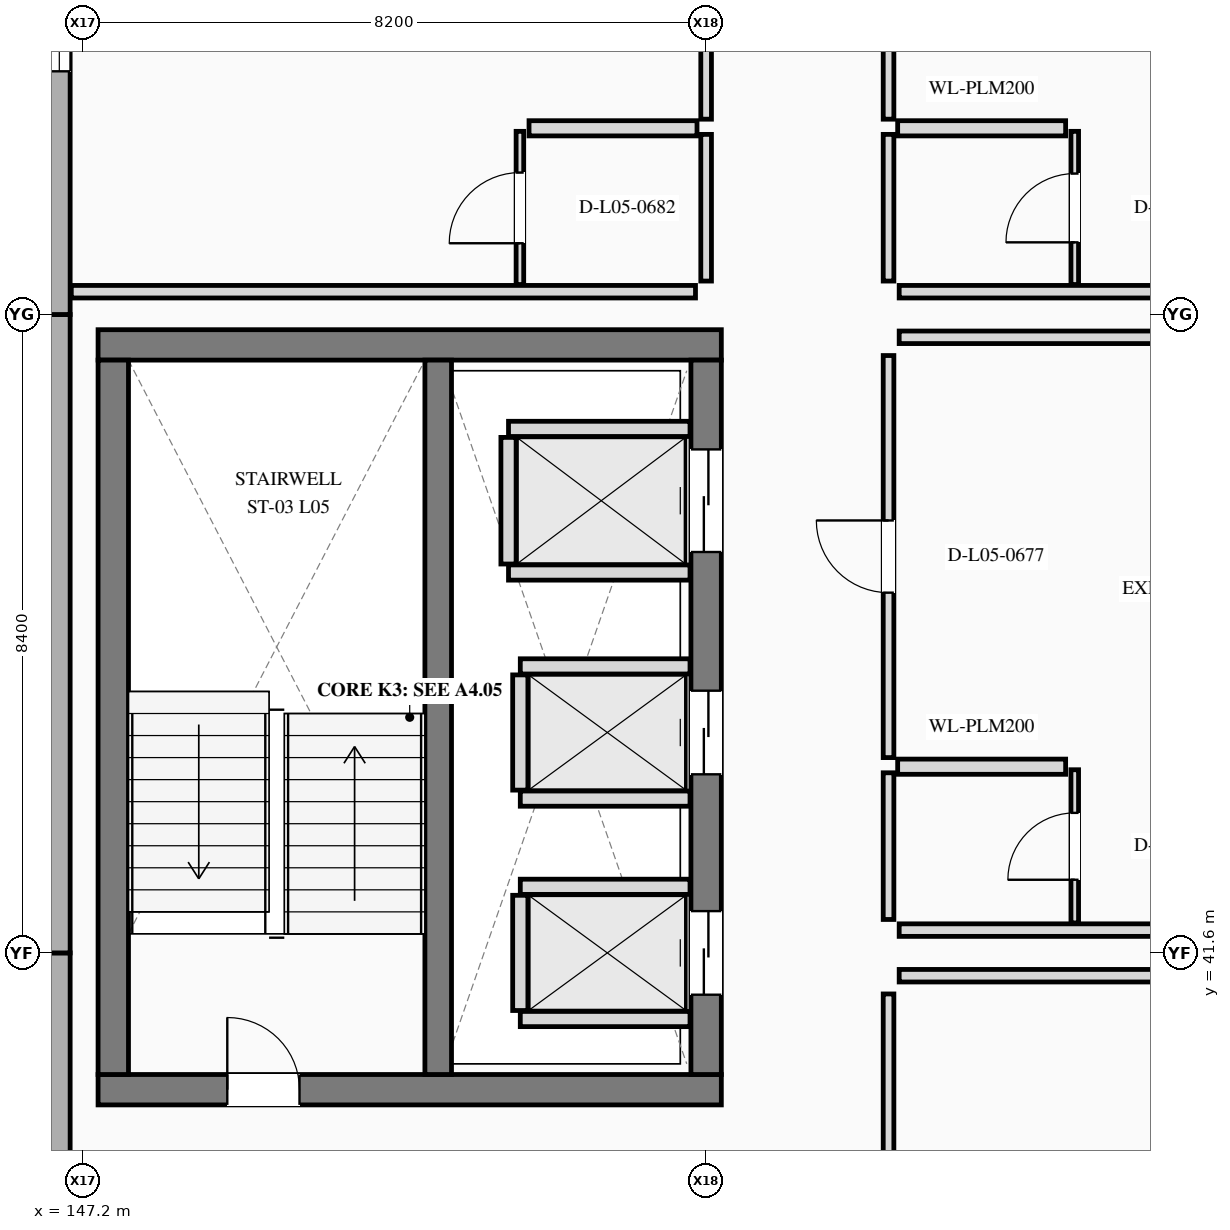
"""IFC4 building model, lengths in metres.
Left out: names, types, materials, properties, quantities, classifications, styles, units other than length and angle.
Written with IfcOpenShell. Run it as: python <this file> out.ifc"""

import sys

from ifc_helpers import new_model, si_unit, direction, frame, frame_2d, origin, place, context, subcontext, project, spatial, rectangle, extrude, element, fill, save


model = new_model("IFC4")
c1 = context("Model", 3, precision=1e-05, world=origin(), true_north=direction((0.0, 1.0)))
c2 = subcontext(c1, "Body", "Model", "MODEL_VIEW")
j1 = project(units=[si_unit("LENGTHUNIT", "METRE"), si_unit("PLANEANGLEUNIT", "RADIAN")], contexts=[c1])
p1 = place(None, origin())
s1 = spatial("IfcSite", under=j1, at=p1, CompositionType="ELEMENT")
p2 = place(p1, origin())
s2 = spatial("IfcBuilding", under=s1, at=p2, CompositionType="ELEMENT")
p3 = place(p2, frame((0.0, 0.0, 23.4)))
s3 = spatial("IfcBuildingStorey", under=s2, at=p3, CompositionType="ELEMENT", Elevation=23.4)
p4 = place(p3, frame((146.89, 33.2, 0.0), z_axis=(0.0, 0.0, 1.0), x_axis=(0.0, 1.0, 0.0)))
e1 = element("IfcWall", 1, at=p4, inside=s3, PredefinedType="STANDARD", context=c2, shape_type="SweptSolid", body=[
    extrude(rectangle(XDim=8.4, YDim=0.285, at=frame_2d((4.2, 0.0))), origin(), (0.0, 0.0, 1.0), 3.6),
])
p5 = place(p3, frame((146.89, 41.6, 0.0), z_axis=(0.0, 0.0, 1.0), x_axis=(0.0, 1.0, 0.0)))
e2 = element("IfcWall", 2, at=p5, inside=s3, PredefinedType="STANDARD", context=c2, shape_type="SweptSolid", body=[
    extrude(rectangle(XDim=8.4, YDim=0.285, at=frame_2d((4.2, 0.0))), origin(), (0.0, 0.0, 1.0), 3.6),
])
p6 = place(p3, frame((146.89, 50.0, 0.0), z_axis=(0.0, 0.0, 1.0), x_axis=(0.0, 1.0, 0.0)))
e3 = element("IfcWall", 3, at=p6, inside=s3, PredefinedType="STANDARD", context=c2, shape_type="SweptSolid", body=[
    extrude(rectangle(XDim=8.4, YDim=0.285, at=frame_2d((4.2, 0.0))), origin(), (0.0, 0.0, 1.0), 3.6),
])
p7 = place(p6, frame((3.2, 0.0, 0.85)))
e4 = element("IfcOpeningElement", 4, at=p7, cuts=e3, PredefinedType="OPENING", context=c2, shape_type="SweptSolid", body=[
    extrude(rectangle(XDim=2.0, YDim=1.65, at=frame_2d((1.0, 0.825))), frame((0.0, 0.152, 0.0), z_axis=(0.0, -1.0, 0.0), x_axis=(1.0, 0.0, 0.0)), (0.0, 0.0, 1.0), 0.305),
])
p8 = place(p3, frame((147.4, 39.8, 0.0), z_axis=(0.0, 0.0, 1.0), x_axis=(1.0, 0.0, 0.0)))
e5 = element("IfcWall", 5, at=p8, inside=s3, PredefinedType="SHEAR", context=c2, shape_type="SweptSolid", body=[
    extrude(rectangle(XDim=8.2, YDim=0.4, at=frame_2d((4.1, 0.0))), origin(), (0.0, 0.0, 1.0), 3.6),
])
p9 = place(p8, frame((1.7, 0.0, 0.0)))
e6 = element("IfcOpeningElement", 6, at=p9, cuts=e5, PredefinedType="OPENING", context=c2, shape_type="SweptSolid", body=[
    extrude(rectangle(XDim=0.95, YDim=2.2, at=frame_2d((0.475, 1.1))), frame((0.0, 0.21, 0.0), z_axis=(0.0, -1.0, 0.0), x_axis=(1.0, 0.0, 0.0)), (0.0, 0.0, 1.0), 0.42),
])
p10 = place(p3, frame((155.6, 49.6, 0.0), z_axis=(0.0, 0.0, 1.0), x_axis=(-1.0, 0.0, 0.0)))
e7 = element("IfcWall", 7, at=p10, inside=s3, PredefinedType="SHEAR", context=c2, shape_type="SweptSolid", body=[
    extrude(rectangle(XDim=8.2, YDim=0.4, at=frame_2d((4.1, 0.0))), origin(), (0.0, 0.0, 1.0), 3.6),
])
p11 = place(p3, frame((147.6, 49.4, 0.0), z_axis=(0.0, 0.0, 1.0), x_axis=(0.0, -1.0, 0.0)))
e8 = element("IfcWall", 8, at=p11, inside=s3, PredefinedType="SHEAR", context=c2, shape_type="SweptSolid", body=[
    extrude(rectangle(XDim=9.4, YDim=0.4, at=frame_2d((4.7, 0.0))), origin(), (0.0, 0.0, 1.0), 3.6),
])
p12 = place(p3, frame((155.4, 40.0, 0.0), z_axis=(0.0, 0.0, 1.0), x_axis=(0.0, 1.0, 0.0)))
e9 = element("IfcWall", 9, at=p12, inside=s3, PredefinedType="SHEAR", context=c2, shape_type="SweptSolid", body=[
    extrude(rectangle(XDim=9.4, YDim=0.4, at=frame_2d((4.7, 0.0))), origin(), (0.0, 0.0, 1.0), 3.6),
])
p13 = place(p12, frame((1.05, 0.0, 0.0)))
e10 = element("IfcOpeningElement", 10, at=p13, cuts=e9, PredefinedType="OPENING", context=c2, shape_type="SweptSolid", body=[
    extrude(rectangle(XDim=1.1, YDim=2.2, at=frame_2d((0.55, 1.1))), frame((0.0, 0.21, 0.0), z_axis=(0.0, -1.0, 0.0), x_axis=(1.0, 0.0, 0.0)), (0.0, 0.0, 1.0), 0.42),
])
p14 = place(p12, frame((3.95, 0.0, 0.0)))
e11 = element("IfcOpeningElement", 11, at=p14, cuts=e9, PredefinedType="OPENING", context=c2, shape_type="SweptSolid", body=[
    extrude(rectangle(XDim=1.1, YDim=2.2, at=frame_2d((0.55, 1.1))), frame((0.0, 0.21, 0.0), z_axis=(0.0, -1.0, 0.0), x_axis=(1.0, 0.0, 0.0)), (0.0, 0.0, 1.0), 0.42),
])
p15 = place(p12, frame((6.875, 0.0, 0.0)))
e12 = element("IfcOpeningElement", 12, at=p15, cuts=e9, PredefinedType="OPENING", context=c2, shape_type="SweptSolid", body=[
    extrude(rectangle(XDim=1.35, YDim=2.3, at=frame_2d((0.675, 1.15))), frame((0.0, 0.21, 0.0), z_axis=(0.0, -1.0, 0.0), x_axis=(1.0, 0.0, 0.0)), (0.0, 0.0, 1.0), 0.42),
])
p16 = place(p3, frame((151.875, 40.0, 0.0), z_axis=(0.0, 0.0, 1.0), x_axis=(0.0, 1.0, 0.0)))
e13 = element("IfcWall", 13, at=p16, inside=s3, PredefinedType="SHEAR", context=c2, shape_type="SweptSolid", body=[
    extrude(rectangle(XDim=9.4, YDim=0.35, at=frame_2d((4.7, 0.0))), origin(), (0.0, 0.0, 1.0), 3.6),
])
for number, where, z_axis, x_axis in (
    (14, (152.955, 40.73, 0.0), (0.0, 0.0, 1.0), (1.0, 0.0, 0.0)),
    (15, (152.955, 42.47, 0.0), (0.0, 0.0, 1.0), (1.0, 0.0, 0.0)),
):
    element("IfcWall", number, at=place(p3, frame(where, z_axis=z_axis, x_axis=x_axis)), inside=s3, PredefinedType="PLUMBINGWALL", context=c2, shape_type="SweptSolid", body=[
        extrude(rectangle(XDim=2.233, YDim=0.2, at=frame_2d((1.116, 0.0))), origin(), (0.0, 0.0, 1.0), 3.3),
    ])
p17 = place(p3, frame((152.955, 40.842, 0.0), z_axis=(0.0, 0.0, 1.0), x_axis=(0.0, 1.0, 0.0)))
e16 = element("IfcWall", 16, at=p17, inside=s3, PredefinedType="PLUMBINGWALL", context=c2, shape_type="SweptSolid", body=[
    extrude(rectangle(XDim=1.516, YDim=0.2, at=frame_2d((0.758, 0.0))), origin(), (0.0, 0.0, 1.0), 3.3),
])
for number, where, z_axis, x_axis in (
    (17, (152.955, 43.63, 0.0), (0.0, 0.0, 1.0), (1.0, 0.0, 0.0)),
    (18, (152.955, 45.37, 0.0), (0.0, 0.0, 1.0), (1.0, 0.0, 0.0)),
):
    element("IfcWall", number, at=place(p3, frame(where, z_axis=z_axis, x_axis=x_axis)), inside=s3, PredefinedType="PLUMBINGWALL", context=c2, shape_type="SweptSolid", body=[
        extrude(rectangle(XDim=2.233, YDim=0.2, at=frame_2d((1.116, 0.0))), origin(), (0.0, 0.0, 1.0), 3.3),
    ])
p18 = place(p3, frame((152.955, 43.742, 0.0), z_axis=(0.0, 0.0, 1.0), x_axis=(0.0, 1.0, 0.0)))
e19 = element("IfcWall", 19, at=p18, inside=s3, PredefinedType="PLUMBINGWALL", context=c2, shape_type="SweptSolid", body=[
    extrude(rectangle(XDim=1.516, YDim=0.2, at=frame_2d((0.758, 0.0))), origin(), (0.0, 0.0, 1.0), 3.3),
])
for number, where, z_axis, x_axis in (
    (20, (152.8, 46.605, 0.0), (0.0, 0.0, 1.0), (1.0, 0.0, 0.0)),
    (21, (152.8, 48.495, 0.0), (0.0, 0.0, 1.0), (1.0, 0.0, 0.0)),
):
    element("IfcWall", number, at=place(p3, frame(where, z_axis=z_axis, x_axis=x_axis)), inside=s3, PredefinedType="PLUMBINGWALL", context=c2, shape_type="SweptSolid", body=[
        extrude(rectangle(XDim=2.388, YDim=0.2, at=frame_2d((1.194, 0.0))), origin(), (0.0, 0.0, 1.0), 3.3),
    ])
p19 = place(p3, frame((152.8, 46.717, 0.0), z_axis=(0.0, 0.0, 1.0), x_axis=(0.0, 1.0, 0.0)))
e22 = element("IfcWall", 22, at=p19, inside=s3, PredefinedType="PLUMBINGWALL", context=c2, shape_type="SweptSolid", body=[
    extrude(rectangle(XDim=1.666, YDim=0.2, at=frame_2d((0.833, 0.0))), origin(), (0.0, 0.0, 1.0), 3.3),
])
p20 = place(p3, frame((157.8, 35.77, 0.0), z_axis=(0.0, 0.0, 1.0), x_axis=(0.0, 1.0, 0.0)))
e23 = element("IfcWall", 23, at=p20, inside=s3, PredefinedType="PARTITIONING", context=c2, shape_type="SweptSolid", body=[
    extrude(rectangle(XDim=5.29, YDim=0.14, at=frame_2d((2.645, 0.0))), origin(), (0.0, 0.0, 1.0), 3.3),
])
p21 = place(p20, frame((2.11, 0.0, 0.0)))
e24 = element("IfcOpeningElement", 24, at=p21, cuts=e23, PredefinedType="OPENING", context=c2, shape_type="SweptSolid", body=[
    extrude(rectangle(XDim=1.07, YDim=2.25, at=frame_2d((0.535, 1.125))), frame((0.0, 0.08, 0.0), z_axis=(0.0, -1.0, 0.0), x_axis=(1.0, 0.0, 0.0)), (0.0, 0.0, 1.0), 0.16),
])
p22 = place(p3, frame((157.94, 41.3, 0.0), z_axis=(0.0, 0.0, 1.0), x_axis=(1.0, 0.0, 0.0)))
e25 = element("IfcWall", 25, at=p22, inside=s3, PredefinedType="PARTITIONING", context=c2, shape_type="SweptSolid", body=[
    extrude(rectangle(XDim=8.213, YDim=0.165, at=frame_2d((4.106, 0.0))), origin(), (0.0, 0.0, 1.0), 2.69),
])
p23 = place(p3, frame((157.8, 42.04, 0.0), z_axis=(0.0, 0.0, 1.0), x_axis=(0.0, 1.0, 0.0)))
e26 = element("IfcWall", 26, at=p23, inside=s3, PredefinedType="PARTITIONING", context=c2, shape_type="SweptSolid", body=[
    extrude(rectangle(XDim=1.93, YDim=0.14, at=frame_2d((0.965, 0.0))), origin(), (0.0, 0.0, 1.0), 2.853),
])
p24 = place(p3, frame((157.8, 44.17, 0.0), z_axis=(0.0, 0.0, 1.0), x_axis=(0.0, 1.0, 0.0)))
e27 = element("IfcWall", 27, at=p24, inside=s3, PredefinedType="PARTITIONING", context=c2, shape_type="SweptSolid", body=[
    extrude(rectangle(XDim=5.29, YDim=0.14, at=frame_2d((2.645, 0.0))), origin(), (0.0, 0.0, 1.0), 2.853),
])
p25 = place(p24, frame((2.17, 0.0, 0.0)))
e28 = element("IfcOpeningElement", 28, at=p25, cuts=e27, PredefinedType="OPENING", context=c2, shape_type="SweptSolid", body=[
    extrude(rectangle(XDim=0.95, YDim=2.3, at=frame_2d((0.475, 1.15))), frame((0.0, 0.08, 0.0), z_axis=(0.0, -1.0, 0.0), x_axis=(1.0, 0.0, 0.0)), (0.0, 0.0, 1.0), 0.16),
])
for number, where, z_axis, x_axis in (
    (29, (157.94, 41.9, 0.0), (0.0, 0.0, 1.0), (1.0, 0.0, 0.0)),
    (30, (157.94, 49.7, 0.0), (0.0, 0.0, 1.0), (1.0, 0.0, 0.0)),
):
    element("IfcWall", number, at=place(p3, frame(where, z_axis=z_axis, x_axis=x_axis)), inside=s3, PredefinedType="PARTITIONING", context=c2, shape_type="SweptSolid", body=[
        extrude(rectangle(XDim=8.213, YDim=0.165, at=frame_2d((4.106, 0.0))), origin(), (0.0, 0.0, 1.0), 2.69),
    ])
p26 = place(p3, frame((157.92, 44.05, 0.0), z_axis=(0.0, 0.0, 1.0), x_axis=(1.0, 0.0, 0.0)))
e31 = element("IfcWall", 31, at=p26, inside=s3, PredefinedType="PLUMBINGWALL", context=c2, shape_type="SweptSolid", body=[
    extrude(rectangle(XDim=2.21, YDim=0.2, at=frame_2d((1.105, 0.0))), origin(), (0.0, 0.0, 1.0), 3.3),
])
p27 = place(p3, frame((160.25, 41.994, 0.0), z_axis=(0.0, 0.0, 1.0), x_axis=(0.0, 1.0, 0.0)))
e32 = element("IfcWall", 32, at=p27, inside=s3, PredefinedType="PARTITIONING", context=c2, shape_type="SweptSolid", body=[
    extrude(rectangle(XDim=2.016, YDim=0.1, at=frame_2d((1.008, 0.0))), origin(), (0.0, 0.0, 1.0), 2.853),
])
p28 = place(p27, frame((0.568, 0.0, 0.0)))
e33 = element("IfcOpeningElement", 33, at=p28, cuts=e32, PredefinedType="OPENING", context=c2, shape_type="SweptSolid", body=[
    extrude(rectangle(XDim=0.88, YDim=2.1, at=frame_2d((0.44, 1.05))), frame((0.0, 0.06, 0.0), z_axis=(0.0, -1.0, 0.0), x_axis=(1.0, 0.0, 0.0)), (0.0, 0.0, 1.0), 0.12),
])
p29 = place(p3, frame((157.8, 50.44, 0.0), z_axis=(0.0, 0.0, 1.0), x_axis=(0.0, 1.0, 0.0)))
e34 = element("IfcWall", 34, at=p29, inside=s3, PredefinedType="PARTITIONING", context=c2, shape_type="SweptSolid", body=[
    extrude(rectangle(XDim=1.93, YDim=0.14, at=frame_2d((0.965, 0.0))), origin(), (0.0, 0.0, 1.0), 3.3),
])
p30 = place(p3, frame((157.8, 52.57, 0.0), z_axis=(0.0, 0.0, 1.0), x_axis=(0.0, 1.0, 0.0)))
e35 = element("IfcWall", 35, at=p30, inside=s3, PredefinedType="PARTITIONING", context=c2, shape_type="SweptSolid", body=[
    extrude(rectangle(XDim=5.29, YDim=0.14, at=frame_2d((2.645, 0.0))), origin(), (0.0, 0.0, 1.0), 3.3),
])
p31 = place(p30, frame((2.155, 0.0, 0.0)))
e36 = element("IfcOpeningElement", 36, at=p31, cuts=e35, PredefinedType="OPENING", context=c2, shape_type="SweptSolid", body=[
    extrude(rectangle(XDim=0.98, YDim=2.35, at=frame_2d((0.49, 1.175))), frame((0.0, 0.08, 0.0), z_axis=(0.0, -1.0, 0.0), x_axis=(1.0, 0.0, 0.0)), (0.0, 0.0, 1.0), 0.16),
])
p32 = place(p3, frame((157.94, 50.3, 0.0), z_axis=(0.0, 0.0, 1.0), x_axis=(1.0, 0.0, 0.0)))
e37 = element("IfcWall", 37, at=p32, inside=s3, PredefinedType="PARTITIONING", context=c2, shape_type="SweptSolid", body=[
    extrude(rectangle(XDim=8.213, YDim=0.165, at=frame_2d((4.106, 0.0))), origin(), (0.0, 0.0, 1.0), 2.69),
])
p33 = place(p3, frame((157.92, 52.45, 0.0), z_axis=(0.0, 0.0, 1.0), x_axis=(1.0, 0.0, 0.0)))
e38 = element("IfcWall", 38, at=p33, inside=s3, PredefinedType="PLUMBINGWALL", context=c2, shape_type="SweptSolid", body=[
    extrude(rectangle(XDim=2.21, YDim=0.2, at=frame_2d((1.105, 0.0))), origin(), (0.0, 0.0, 1.0), 3.3),
])
p34 = place(p3, frame((160.25, 50.395, 0.0), z_axis=(0.0, 0.0, 1.0), x_axis=(0.0, 1.0, 0.0)))
e39 = element("IfcWall", 39, at=p34, inside=s3, PredefinedType="PARTITIONING", context=c2, shape_type="SweptSolid", body=[
    extrude(rectangle(XDim=2.015, YDim=0.1, at=frame_2d((1.008, 0.0))), origin(), (0.0, 0.0, 1.0), 3.3),
])
p35 = place(p34, frame((0.555, 0.0, 0.0)))
e40 = element("IfcOpeningElement", 40, at=p35, cuts=e39, PredefinedType="OPENING", context=c2, shape_type="SweptSolid", body=[
    extrude(rectangle(XDim=0.905, YDim=2.1, at=frame_2d((0.453, 1.05))), frame((0.0, 0.06, 0.0), z_axis=(0.0, -1.0, 0.0), x_axis=(1.0, 0.0, 0.0)), (0.0, 0.0, 1.0), 0.12),
])
p36 = place(p3, frame((155.4, 50.44, 0.0), z_axis=(0.0, 0.0, 1.0), x_axis=(0.0, 1.0, 0.0)))
e41 = element("IfcWall", 41, at=p36, inside=s3, PredefinedType="PARTITIONING", context=c2, shape_type="SweptSolid", body=[
    extrude(rectangle(XDim=1.93, YDim=0.14, at=frame_2d((0.965, 0.0))), origin(), (0.0, 0.0, 1.0), 2.69),
])
p37 = place(p3, frame((155.4, 52.57, 0.0), z_axis=(0.0, 0.0, 1.0), x_axis=(0.0, 1.0, 0.0)))
e42 = element("IfcWall", 42, at=p37, inside=s3, PredefinedType="PARTITIONING", context=c2, shape_type="SweptSolid", body=[
    extrude(rectangle(XDim=5.29, YDim=0.14, at=frame_2d((2.645, 0.0))), origin(), (0.0, 0.0, 1.0), 2.69),
])
p38 = place(p37, frame((2.14, 0.0, 0.0)))
e43 = element("IfcOpeningElement", 43, at=p38, cuts=e42, PredefinedType="OPENING", context=c2, shape_type="SweptSolid", body=[
    extrude(rectangle(XDim=1.01, YDim=2.35, at=frame_2d((0.505, 1.175))), frame((0.0, 0.08, 0.0), z_axis=(0.0, -1.0, 0.0), x_axis=(1.0, 0.0, 0.0)), (0.0, 0.0, 1.0), 0.16),
])
p39 = place(p3, frame((147.048, 50.3, 0.0), z_axis=(0.0, 0.0, 1.0), x_axis=(1.0, 0.0, 0.0)))
e44 = element("IfcWall", 44, at=p39, inside=s3, PredefinedType="PARTITIONING", context=c2, shape_type="SweptSolid", body=[
    extrude(rectangle(XDim=8.212, YDim=0.165, at=frame_2d((4.106, 0.0))), origin(), (0.0, 0.0, 1.0), 3.3),
])
p40 = place(p3, frame((153.07, 52.45, 0.0), z_axis=(0.0, 0.0, 1.0), x_axis=(1.0, 0.0, 0.0)))
e45 = element("IfcWall", 45, at=p40, inside=s3, PredefinedType="PLUMBINGWALL", context=c2, shape_type="SweptSolid", body=[
    extrude(rectangle(XDim=2.21, YDim=0.2, at=frame_2d((1.105, 0.0))), origin(), (0.0, 0.0, 1.0), 3.3),
])
p41 = place(p3, frame((152.95, 50.395, 0.0), z_axis=(0.0, 0.0, 1.0), x_axis=(0.0, 1.0, 0.0)))
e46 = element("IfcWall", 46, at=p41, inside=s3, PredefinedType="PARTITIONING", context=c2, shape_type="SweptSolid", body=[
    extrude(rectangle(XDim=2.015, YDim=0.1, at=frame_2d((1.008, 0.0))), origin(), (0.0, 0.0, 1.0), 3.3),
])
p42 = place(p41, frame((0.543, 0.0, 0.0)))
e47 = element("IfcOpeningElement", 47, at=p42, cuts=e46, PredefinedType="OPENING", context=c2, shape_type="SweptSolid", body=[
    extrude(rectangle(XDim=0.93, YDim=2.14, at=frame_2d((0.465, 1.07))), frame((0.0, 0.06, 0.0), z_axis=(0.0, -1.0, 0.0), x_axis=(1.0, 0.0, 0.0)), (0.0, 0.0, 1.0), 0.12),
])
p43 = place(p7, origin())
e48 = element("IfcWindow", 48, at=p43, inside=s3, PartitioningType="SINGLE_PANEL", PredefinedType="WINDOW", context=c2, shape_type="SweptSolid", body=[
    extrude(rectangle(XDim=2.0, YDim=1.65, at=frame_2d((1.0, 0.825))), frame((0.0, 0.03, 0.0), z_axis=(0.0, -1.0, 0.0), x_axis=(1.0, 0.0, 0.0)), (0.0, 0.0, 1.0), 0.06),
])
fill(e4, e48)
p44 = place(p9, origin())
e49 = element("IfcDoor", 49, at=p44, inside=s3, OperationType="SINGLE_SWING_LEFT", PredefinedType="DOOR", context=c2, shape_type="SweptSolid", body=[
    extrude(rectangle(XDim=0.95, YDim=2.2, at=frame_2d((0.475, 1.1))), frame((0.0, 0.025, 0.0), z_axis=(0.0, -1.0, 0.0), x_axis=(1.0, 0.0, 0.0)), (0.0, 0.0, 1.0), 0.05),
])
fill(e6, e49)
p45 = place(p13, origin())
e50 = element("IfcDoor", 50, at=p45, inside=s3, OperationType="SLIDING_TO_LEFT", PredefinedType="DOOR", context=c2, shape_type="SweptSolid", body=[
    extrude(rectangle(XDim=1.1, YDim=2.2, at=frame_2d((0.55, 1.1))), frame((0.0, 0.025, 0.0), z_axis=(0.0, -1.0, 0.0), x_axis=(1.0, 0.0, 0.0)), (0.0, 0.0, 1.0), 0.05),
])
fill(e10, e50)
p46 = place(p14, origin())
e51 = element("IfcDoor", 51, at=p46, inside=s3, OperationType="SLIDING_TO_RIGHT", PredefinedType="DOOR", context=c2, shape_type="SweptSolid", body=[
    extrude(rectangle(XDim=1.1, YDim=2.2, at=frame_2d((0.55, 1.1))), frame((0.0, 0.025, 0.0), z_axis=(0.0, -1.0, 0.0), x_axis=(1.0, 0.0, 0.0)), (0.0, 0.0, 1.0), 0.05),
])
fill(e11, e51)
p47 = place(p15, origin())
e52 = element("IfcDoor", 52, at=p47, inside=s3, OperationType="SLIDING_TO_LEFT", PredefinedType="DOOR", context=c2, shape_type="SweptSolid", body=[
    extrude(rectangle(XDim=1.35, YDim=2.3, at=frame_2d((0.675, 1.15))), frame((0.0, 0.025, 0.0), z_axis=(0.0, -1.0, 0.0), x_axis=(1.0, 0.0, 0.0)), (0.0, 0.0, 1.0), 0.05),
])
fill(e12, e52)
p48 = place(p25, origin())
e53 = element("IfcDoor", 53, at=p48, inside=s3, OperationType="SINGLE_SWING_RIGHT", PredefinedType="DOOR", context=c2, shape_type="SweptSolid", body=[
    extrude(rectangle(XDim=0.95, YDim=2.3, at=frame_2d((0.475, 1.15))), frame((0.0, 0.025, 0.0), z_axis=(0.0, -1.0, 0.0), x_axis=(1.0, 0.0, 0.0)), (0.0, 0.0, 1.0), 0.05),
])
fill(e28, e53)
p49 = place(p28, origin())
e54 = element("IfcDoor", 54, at=p49, inside=s3, OperationType="SINGLE_SWING_LEFT", PredefinedType="DOOR", context=c2, shape_type="SweptSolid", body=[
    extrude(rectangle(XDim=0.88, YDim=2.1, at=frame_2d((0.44, 1.05))), frame((0.0, 0.025, 0.0), z_axis=(0.0, -1.0, 0.0), x_axis=(1.0, 0.0, 0.0)), (0.0, 0.0, 1.0), 0.05),
])
fill(e33, e54)
p50 = place(p35, origin())
e55 = element("IfcDoor", 55, at=p50, inside=s3, OperationType="SINGLE_SWING_LEFT", PredefinedType="DOOR", context=c2, shape_type="SweptSolid", body=[
    extrude(rectangle(XDim=0.905, YDim=2.1, at=frame_2d((0.453, 1.05))), frame((0.0, 0.025, 0.0), z_axis=(0.0, -1.0, 0.0), x_axis=(1.0, 0.0, 0.0)), (0.0, 0.0, 1.0), 0.05),
])
fill(e40, e55)
p51 = place(p42, origin())
e56 = element("IfcDoor", 56, at=p51, inside=s3, OperationType="SINGLE_SWING_LEFT", PredefinedType="DOOR", context=c2, shape_type="SweptSolid", body=[
    extrude(rectangle(XDim=0.93, YDim=2.14, at=frame_2d((0.465, 1.07))), frame((0.0, 0.025, 0.0), z_axis=(0.0, -1.0, 0.0), x_axis=(1.0, 0.0, 0.0)), (0.0, 0.0, 1.0), 0.05),
])
fill(e47, e56)
save(model, sys.argv[1])
